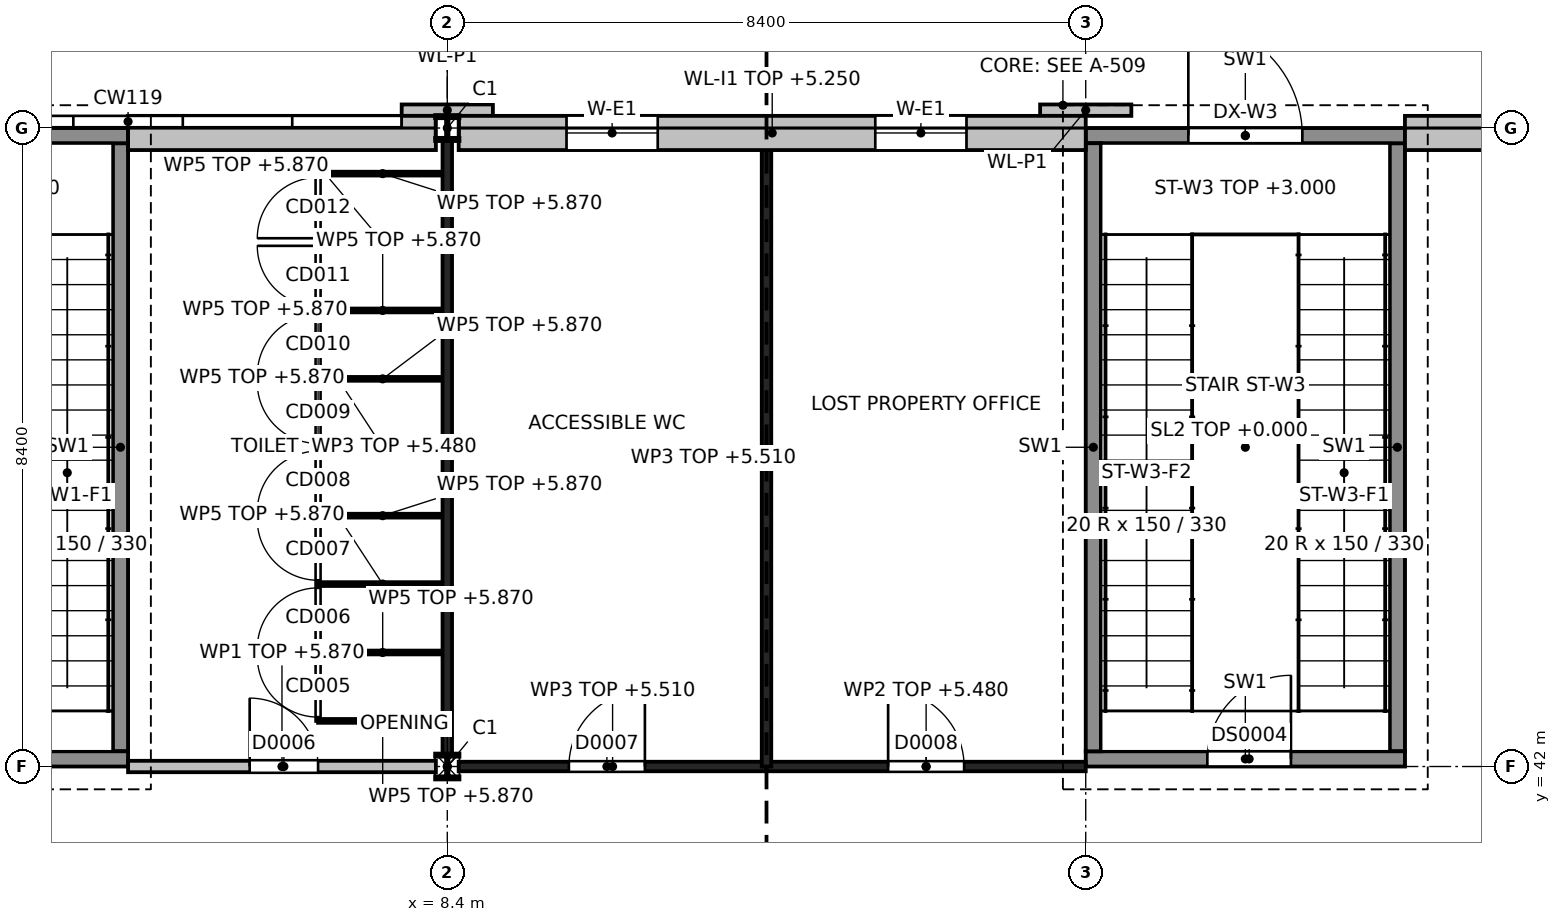
"""IFC4 building model, lengths in metres.
Left out: names, types, materials, properties, quantities, classifications, styles, units other than length and angle.
Written with IfcOpenShell. Run it as: python <this file> out.ifc"""

import sys

from ifc_helpers import new_model, si_unit, direction, frame, frame_2d, origin, origin_2d, place, context, subcontext, project, spatial, rectangle, i_section, extrude, element, fill, save


model = new_model("IFC4")
c1 = context("Model", 3, precision=1e-05, world=origin(), true_north=direction((0.0, 1.0)))
c2 = subcontext(c1, "Body", "Model", "MODEL_VIEW")
j1 = project(units=[si_unit("LENGTHUNIT", "METRE"), si_unit("PLANEANGLEUNIT", "RADIAN")], contexts=[c1])
p1 = place(None, origin())
s1 = spatial("IfcSite", under=j1, at=p1, CompositionType="ELEMENT")
p2 = place(p1, origin())
s2 = spatial("IfcBuilding", under=s1, at=p2, CompositionType="ELEMENT")
p3 = place(p2, origin())
s3 = spatial("IfcBuildingStorey", under=s2, at=p3, CompositionType="ELEMENT", Elevation=0.0)
for number, where, z_axis, x_axis in (
    (1, (8.4, 42.0, -1.35), (0.0, 0.0, 1.0), (1.0, 0.0, 0.0)),
    (2, (8.4, 50.4, -1.35), (0.0, 0.0, 1.0), (1.0, 0.0, 0.0)),
):
    element("IfcColumn", number, at=place(p3, frame(where, z_axis=z_axis, x_axis=x_axis)), inside=s3, PredefinedType="COLUMN", context=c2, shape_type="SweptSolid", body=[
        extrude(i_section(OverallWidth=0.3, OverallDepth=0.32, WebThickness=0.011, FlangeThickness=0.021, at=origin_2d()), origin(), (0.0, 0.0, 1.0), 7.35),
    ])
p4 = place(p3, frame((0.0, 42.1, -1.35), z_axis=(0.0, 0.0, 1.0), x_axis=(1.0, 0.0, 0.0)))
e3 = element("IfcWall", 3, at=p4, inside=s3, PredefinedType="SHEAR", context=c2, shape_type="SweptSolid", body=[
    extrude(rectangle(XDim=4.2, YDim=0.2, at=frame_2d((2.1, 0.0))), origin(), (0.0, 0.0, 1.0), 7.35),
])
p5 = place(p4, frame((1.6, 0.0, 1.35)))
e4 = element("IfcOpeningElement", 4, at=p5, cuts=e3, PredefinedType="OPENING", context=c2, shape_type="SweptSolid", body=[
    extrude(rectangle(XDim=1.1, YDim=2.1, at=frame_2d((0.55, 1.05))), frame((0.0, 0.1, 0.0), z_axis=(0.0, -1.0, 0.0), x_axis=(1.0, 0.0, 0.0)), (0.0, 0.0, 1.0), 0.2),
])
p6 = place(p3, frame((0.0, 50.3, -1.35), z_axis=(0.0, 0.0, 1.0), x_axis=(1.0, 0.0, 0.0)))
e5 = element("IfcWall", 5, at=p6, inside=s3, PredefinedType="SHEAR", context=c2, shape_type="SweptSolid", body=[
    extrude(rectangle(XDim=4.2, YDim=0.2, at=frame_2d((2.1, 0.0))), origin(), (0.0, 0.0, 1.0), 7.35),
])
p7 = place(p3, frame((4.1, 42.2, -1.35), z_axis=(0.0, 0.0, 1.0), x_axis=(0.0, 1.0, 0.0)))
e6 = element("IfcWall", 6, at=p7, inside=s3, PredefinedType="SHEAR", context=c2, shape_type="SweptSolid", body=[
    extrude(rectangle(XDim=8.0, YDim=0.2, at=frame_2d((4.0, 0.0))), origin(), (0.0, 0.0, 1.0), 7.35),
])
p8 = place(p3, frame((16.8, 42.1, -1.35), z_axis=(0.0, 0.0, 1.0), x_axis=(1.0, 0.0, 0.0)))
e7 = element("IfcWall", 7, at=p8, inside=s3, PredefinedType="SHEAR", context=c2, shape_type="SweptSolid", body=[
    extrude(rectangle(XDim=4.2, YDim=0.2, at=frame_2d((2.1, 0.0))), origin(), (0.0, 0.0, 1.0), 7.35),
])
p9 = place(p8, frame((1.6, 0.0, 1.35)))
e8 = element("IfcOpeningElement", 8, at=p9, cuts=e7, PredefinedType="OPENING", context=c2, shape_type="SweptSolid", body=[
    extrude(rectangle(XDim=1.1, YDim=2.1, at=frame_2d((0.55, 1.05))), frame((0.0, 0.1, 0.0), z_axis=(0.0, -1.0, 0.0), x_axis=(1.0, 0.0, 0.0)), (0.0, 0.0, 1.0), 0.2),
])
p10 = place(p3, frame((16.8, 50.3, -1.35), z_axis=(0.0, 0.0, 1.0), x_axis=(1.0, 0.0, 0.0)))
e9 = element("IfcWall", 9, at=p10, inside=s3, PredefinedType="SHEAR", context=c2, shape_type="SweptSolid", body=[
    extrude(rectangle(XDim=4.2, YDim=0.2, at=frame_2d((2.1, 0.0))), origin(), (0.0, 0.0, 1.0), 7.35),
])
p11 = place(p10, frame((1.35, 0.0, 1.35)))
e10 = element("IfcOpeningElement", 10, at=p11, cuts=e9, PredefinedType="OPENING", context=c2, shape_type="SweptSolid", body=[
    extrude(rectangle(XDim=1.5, YDim=2.4, at=frame_2d((0.75, 1.2))), frame((0.0, 0.1, 0.0), z_axis=(0.0, -1.0, 0.0), x_axis=(1.0, 0.0, 0.0)), (0.0, 0.0, 1.0), 0.2),
])
for number, where, z_axis, x_axis in (
    (11, (16.9, 42.2, -1.35), (0.0, 0.0, 1.0), (0.0, 1.0, 0.0)),
    (12, (20.9, 42.2, -1.35), (0.0, 0.0, 1.0), (0.0, 1.0, 0.0)),
):
    element("IfcWall", number, at=place(p3, frame(where, z_axis=z_axis, x_axis=x_axis)), inside=s3, PredefinedType="SHEAR", context=c2, shape_type="SweptSolid", body=[
        extrude(rectangle(XDim=8.0, YDim=0.2, at=frame_2d((4.0, 0.0))), origin(), (0.0, 0.0, 1.0), 7.35),
    ])
p12 = place(p3, frame((4.2, 50.335, 0.0), z_axis=(0.0, 0.0, 1.0), x_axis=(1.0, 0.0, 0.0)))
e13 = element("IfcWall", 13, at=p12, inside=s3, PredefinedType="SOLIDWALL", context=c2, shape_type="SweptSolid", body=[
    extrude(rectangle(XDim=4.05, YDim=0.45, at=frame_2d((2.025, 0.0))), origin(), (0.0, 0.0, 1.0), 5.25),
])
p13 = place(p3, frame((8.55, 50.335, 0.0), z_axis=(0.0, 0.0, 1.0), x_axis=(1.0, 0.0, 0.0)))
e14 = element("IfcWall", 14, at=p13, inside=s3, PredefinedType="SOLIDWALL", context=c2, shape_type="SweptSolid", body=[
    extrude(rectangle(XDim=8.25, YDim=0.45, at=frame_2d((4.125, 0.0))), origin(), (0.0, 0.0, 1.0), 5.25),
])
p14 = place(p13, frame((1.419, 0.0, 0.9)))
e15 = element("IfcOpeningElement", 15, at=p14, cuts=e14, PredefinedType="OPENING", context=c2, shape_type="SweptSolid", body=[
    extrude(rectangle(XDim=1.2, YDim=3.0, at=frame_2d((0.6, 1.5))), frame((0.0, 0.225, 0.0), z_axis=(0.0, -1.0, 0.0), x_axis=(1.0, 0.0, 0.0)), (0.0, 0.0, 1.0), 0.45),
])
p15 = place(p13, frame((5.481, 0.0, 0.9)))
e16 = element("IfcOpeningElement", 16, at=p15, cuts=e14, PredefinedType="OPENING", context=c2, shape_type="SweptSolid", body=[
    extrude(rectangle(XDim=1.2, YDim=3.0, at=frame_2d((0.6, 1.5))), frame((0.0, 0.225, 0.0), z_axis=(0.0, -1.0, 0.0), x_axis=(1.0, 0.0, 0.0)), (0.0, 0.0, 1.0), 0.45),
])
p16 = place(p3, frame((21.0, 50.335, 0.0), z_axis=(0.0, 0.0, 1.0), x_axis=(1.0, 0.0, 0.0)))
e17 = element("IfcWall", 17, at=p16, inside=s3, PredefinedType="SOLIDWALL", context=c2, shape_type="SweptSolid", body=[
    extrude(rectangle(XDim=4.05, YDim=0.45, at=frame_2d((2.025, 0.0))), origin(), (0.0, 0.0, 1.0), 5.25),
])
for number, where, z_axis, x_axis in (
    (18, (7.8, 50.635, 0.0), (0.0, 0.0, 1.0), (1.0, 0.0, 0.0)),
    (19, (16.2, 50.635, 0.0), (0.0, 0.0, 1.0), (1.0, 0.0, 0.0)),
):
    element("IfcWall", number, at=place(p3, frame(where, z_axis=z_axis, x_axis=x_axis)), inside=s3, PredefinedType="SOLIDWALL", context=c2, shape_type="SweptSolid", body=[
        extrude(rectangle(XDim=1.2, YDim=0.15, at=frame_2d((0.6, 0.0))), origin(), (0.0, 0.0, 1.0), 6.0),
    ])
p17 = place(p3, frame((4.2, 42.0, 0.0), z_axis=(0.0, 0.0, 1.0), x_axis=(1.0, 0.0, 0.0)))
e20 = element("IfcWall", 20, at=p17, inside=s3, PredefinedType="PARTITIONING", context=c2, shape_type="SweptSolid", body=[
    extrude(rectangle(XDim=4.05, YDim=0.15, at=frame_2d((2.025, 0.0))), origin(), (0.0, 0.0, 1.0), 5.87),
])
p18 = place(p17, frame((1.6, 0.0, 0.0)))
e21 = element("IfcOpeningElement", 21, at=p18, cuts=e20, PredefinedType="OPENING", context=c2, shape_type="SweptSolid", body=[
    extrude(rectangle(XDim=0.9, YDim=2.1, at=frame_2d((0.45, 1.05))), frame((0.0, 0.075, 0.0), z_axis=(0.0, -1.0, 0.0), x_axis=(1.0, 0.0, 0.0)), (0.0, 0.0, 1.0), 0.15),
])
p19 = place(p3, frame((8.55, 42.0, 0.0), z_axis=(0.0, 0.0, 1.0), x_axis=(1.0, 0.0, 0.0)))
e22 = element("IfcWall", 22, at=p19, inside=s3, PredefinedType="PARTITIONING", context=c2, shape_type="SweptSolid", body=[
    extrude(rectangle(XDim=4.05, YDim=0.125, at=frame_2d((2.025, 0.0))), origin(), (0.0, 0.0, 1.0), 5.51),
])
p20 = place(p19, frame((1.45, 0.0, 0.0)))
e23 = element("IfcOpeningElement", 23, at=p20, cuts=e22, PredefinedType="OPENING", context=c2, shape_type="SweptSolid", body=[
    extrude(rectangle(XDim=1.0, YDim=2.1, at=frame_2d((0.5, 1.05))), frame((0.0, 0.062, 0.0), z_axis=(0.0, -1.0, 0.0), x_axis=(1.0, 0.0, 0.0)), (0.0, 0.0, 1.0), 0.125),
])
p21 = place(p3, frame((12.6, 42.0, 0.0), z_axis=(0.0, 0.0, 1.0), x_axis=(1.0, 0.0, 0.0)))
e24 = element("IfcWall", 24, at=p21, inside=s3, PredefinedType="PARTITIONING", context=c2, shape_type="SweptSolid", body=[
    extrude(rectangle(XDim=4.2, YDim=0.125, at=frame_2d((2.1, 0.0))), origin(), (0.0, 0.0, 1.0), 5.48),
])
p22 = place(p21, frame((1.6, 0.0, 0.0)))
e25 = element("IfcOpeningElement", 25, at=p22, cuts=e24, PredefinedType="OPENING", context=c2, shape_type="SweptSolid", body=[
    extrude(rectangle(XDim=1.0, YDim=2.2, at=frame_2d((0.5, 1.1))), frame((0.0, 0.062, 0.0), z_axis=(0.0, -1.0, 0.0), x_axis=(1.0, 0.0, 0.0)), (0.0, 0.0, 1.0), 0.125),
])
p23 = place(p3, frame((8.4, 42.16, 0.0), z_axis=(0.0, 0.0, 1.0), x_axis=(0.0, 1.0, 0.0)))
e26 = element("IfcWall", 26, at=p23, inside=s3, PredefinedType="PARTITIONING", context=c2, shape_type="SweptSolid", body=[
    extrude(rectangle(XDim=8.08, YDim=0.125, at=frame_2d((4.04, 0.0))), origin(), (0.0, 0.0, 1.0), 5.48),
])
p24 = place(p3, frame((12.6, 42.0, 0.0), z_axis=(0.0, 0.0, 1.0), x_axis=(0.0, 1.0, 0.0)))
e27 = element("IfcWall", 27, at=p24, inside=s3, PredefinedType="PARTITIONING", context=c2, shape_type="SweptSolid", body=[
    extrude(rectangle(XDim=8.11, YDim=0.125, at=frame_2d((4.055, 0.0))), origin(), (0.0, 0.0, 1.0), 5.51),
])
p25 = place(p3, frame((6.7, 42.6, 0.0), z_axis=(0.0, 0.0, 1.0), x_axis=(0.0, 1.0, 0.0)))
e28 = element("IfcWall", 28, at=p25, inside=s3, PredefinedType="PARTITIONING", context=c2, shape_type="SweptSolid", body=[
    extrude(rectangle(XDim=7.2, YDim=0.05, at=frame_2d((3.6, 0.0))), origin(), (0.0, 0.0, 1.0), 5.87),
])
p26 = place(p25, frame((0.05, 0.0, 0.0)))
e29 = element("IfcOpeningElement", 29, at=p26, cuts=e28, PredefinedType="OPENING", context=c2, shape_type="SweptSolid", body=[
    extrude(rectangle(XDim=0.8, YDim=2.0, at=frame_2d((0.4, 1.0))), frame((0.0, 0.025, 0.0), z_axis=(0.0, -1.0, 0.0), x_axis=(1.0, 0.0, 0.0)), (0.0, 0.0, 1.0), 0.05),
])
p27 = place(p25, frame((0.95, 0.0, 0.0)))
e30 = element("IfcOpeningElement", 30, at=p27, cuts=e28, PredefinedType="OPENING", context=c2, shape_type="SweptSolid", body=[
    extrude(rectangle(XDim=0.8, YDim=2.0, at=frame_2d((0.4, 1.0))), frame((0.0, 0.025, 0.0), z_axis=(0.0, -1.0, 0.0), x_axis=(1.0, 0.0, 0.0)), (0.0, 0.0, 1.0), 0.05),
])
p28 = place(p25, frame((1.85, 0.0, 0.0)))
e31 = element("IfcOpeningElement", 31, at=p28, cuts=e28, PredefinedType="OPENING", context=c2, shape_type="SweptSolid", body=[
    extrude(rectangle(XDim=0.8, YDim=2.0, at=frame_2d((0.4, 1.0))), frame((0.0, 0.025, 0.0), z_axis=(0.0, -1.0, 0.0), x_axis=(1.0, 0.0, 0.0)), (0.0, 0.0, 1.0), 0.05),
])
p29 = place(p25, frame((2.75, 0.0, 0.0)))
e32 = element("IfcOpeningElement", 32, at=p29, cuts=e28, PredefinedType="OPENING", context=c2, shape_type="SweptSolid", body=[
    extrude(rectangle(XDim=0.8, YDim=2.0, at=frame_2d((0.4, 1.0))), frame((0.0, 0.025, 0.0), z_axis=(0.0, -1.0, 0.0), x_axis=(1.0, 0.0, 0.0)), (0.0, 0.0, 1.0), 0.05),
])
p30 = place(p25, frame((3.65, 0.0, 0.0)))
e33 = element("IfcOpeningElement", 33, at=p30, cuts=e28, PredefinedType="OPENING", context=c2, shape_type="SweptSolid", body=[
    extrude(rectangle(XDim=0.8, YDim=2.0, at=frame_2d((0.4, 1.0))), frame((0.0, 0.025, 0.0), z_axis=(0.0, -1.0, 0.0), x_axis=(1.0, 0.0, 0.0)), (0.0, 0.0, 1.0), 0.05),
])
p31 = place(p25, frame((4.55, 0.0, 0.0)))
e34 = element("IfcOpeningElement", 34, at=p31, cuts=e28, PredefinedType="OPENING", context=c2, shape_type="SweptSolid", body=[
    extrude(rectangle(XDim=0.8, YDim=2.0, at=frame_2d((0.4, 1.0))), frame((0.0, 0.025, 0.0), z_axis=(0.0, -1.0, 0.0), x_axis=(1.0, 0.0, 0.0)), (0.0, 0.0, 1.0), 0.05),
])
p32 = place(p25, frame((5.45, 0.0, 0.0)))
e35 = element("IfcOpeningElement", 35, at=p32, cuts=e28, PredefinedType="OPENING", context=c2, shape_type="SweptSolid", body=[
    extrude(rectangle(XDim=0.8, YDim=2.0, at=frame_2d((0.4, 1.0))), frame((0.0, 0.025, 0.0), z_axis=(0.0, -1.0, 0.0), x_axis=(1.0, 0.0, 0.0)), (0.0, 0.0, 1.0), 0.05),
])
p33 = place(p25, frame((6.35, 0.0, 0.0)))
e36 = element("IfcOpeningElement", 36, at=p33, cuts=e28, PredefinedType="OPENING", context=c2, shape_type="SweptSolid", body=[
    extrude(rectangle(XDim=0.8, YDim=2.0, at=frame_2d((0.4, 1.0))), frame((0.0, 0.025, 0.0), z_axis=(0.0, -1.0, 0.0), x_axis=(1.0, 0.0, 0.0)), (0.0, 0.0, 1.0), 0.05),
])
for number, where, z_axis, x_axis in (
    (37, (8.4, 42.6, 0.0), (0.0, 0.0, 1.0), (-1.0, 0.0, 0.0)),
    (38, (8.4, 43.5, 0.0), (0.0, 0.0, 1.0), (-1.0, 0.0, 0.0)),
    (39, (8.4, 44.4, 0.0), (0.0, 0.0, 1.0), (-1.0, 0.0, 0.0)),
    (40, (8.4, 45.3, 0.0), (0.0, 0.0, 1.0), (-1.0, 0.0, 0.0)),
    (41, (8.4, 46.2, 0.0), (0.0, 0.0, 1.0), (-1.0, 0.0, 0.0)),
    (42, (8.4, 47.1, 0.0), (0.0, 0.0, 1.0), (-1.0, 0.0, 0.0)),
    (43, (8.4, 48.0, 0.0), (0.0, 0.0, 1.0), (-1.0, 0.0, 0.0)),
    (44, (8.4, 48.9, 0.0), (0.0, 0.0, 1.0), (-1.0, 0.0, 0.0)),
    (45, (8.4, 49.8, 0.0), (0.0, 0.0, 1.0), (-1.0, 0.0, 0.0)),
):
    element("IfcWall", number, at=place(p3, frame(where, z_axis=z_axis, x_axis=x_axis)), inside=s3, PredefinedType="PARTITIONING", context=c2, shape_type="SweptSolid", body=[
        extrude(rectangle(XDim=1.7, YDim=0.05, at=frame_2d((0.85, 0.0))), origin(), (0.0, 0.0, 1.0), 5.87),
    ])
p34 = place(p14, origin())
e46 = element("IfcWindow", 46, at=p34, inside=s3, PartitioningType="SINGLE_PANEL", PredefinedType="WINDOW", context=c2, shape_type="SweptSolid", body=[
    extrude(rectangle(XDim=1.2, YDim=3.0, at=frame_2d((0.6, 1.5))), frame((0.0, 0.03, 0.0), z_axis=(0.0, -1.0, 0.0), x_axis=(1.0, 0.0, 0.0)), (0.0, 0.0, 1.0), 0.06),
])
fill(e15, e46)
p35 = place(p15, origin())
e47 = element("IfcWindow", 47, at=p35, inside=s3, PartitioningType="SINGLE_PANEL", PredefinedType="WINDOW", context=c2, shape_type="SweptSolid", body=[
    extrude(rectangle(XDim=1.2, YDim=3.0, at=frame_2d((0.6, 1.5))), frame((0.0, 0.03, 0.0), z_axis=(0.0, -1.0, 0.0), x_axis=(1.0, 0.0, 0.0)), (0.0, 0.0, 1.0), 0.06),
])
fill(e16, e47)
p36 = place(p11, origin())
e48 = element("IfcDoor", 48, at=p36, inside=s3, OperationType="DOUBLE_DOOR_SINGLE_SWING", PredefinedType="DOOR", context=c2, shape_type="SweptSolid", body=[
    extrude(rectangle(XDim=1.5, YDim=2.4, at=frame_2d((0.75, 1.2))), frame((0.0, 0.025, 0.0), z_axis=(0.0, -1.0, 0.0), x_axis=(1.0, 0.0, 0.0)), (0.0, 0.0, 1.0), 0.05),
])
fill(e10, e48)
p37 = place(p18, origin())
e49 = element("IfcDoor", 49, at=p37, inside=s3, OperationType="SINGLE_SWING_LEFT", PredefinedType="DOOR", context=c2, shape_type="SweptSolid", body=[
    extrude(rectangle(XDim=0.9, YDim=2.1, at=frame_2d((0.45, 1.05))), frame((0.0, 0.025, 0.0), z_axis=(0.0, -1.0, 0.0), x_axis=(1.0, 0.0, 0.0)), (0.0, 0.0, 1.0), 0.05),
])
fill(e21, e49)
p38 = place(p20, origin())
e50 = element("IfcDoor", 50, at=p38, inside=s3, OperationType="SINGLE_SWING_RIGHT", PredefinedType="DOOR", context=c2, shape_type="SweptSolid", body=[
    extrude(rectangle(XDim=1.0, YDim=2.1, at=frame_2d((0.5, 1.05))), frame((0.0, 0.025, 0.0), z_axis=(0.0, -1.0, 0.0), x_axis=(1.0, 0.0, 0.0)), (0.0, 0.0, 1.0), 0.05),
])
fill(e23, e50)
p39 = place(p22, origin())
e51 = element("IfcDoor", 51, at=p39, inside=s3, OperationType="SINGLE_SWING_LEFT", PredefinedType="DOOR", context=c2, shape_type="SweptSolid", body=[
    extrude(rectangle(XDim=1.0, YDim=2.2, at=frame_2d((0.5, 1.1))), frame((0.0, 0.025, 0.0), z_axis=(0.0, -1.0, 0.0), x_axis=(1.0, 0.0, 0.0)), (0.0, 0.0, 1.0), 0.05),
])
fill(e25, e51)
p40 = place(p9, frame((1.1, 0.05, 0.0), z_axis=(0.0, 0.0, 1.0), x_axis=(-1.0, 0.0, 0.0)))
e52 = element("IfcDoor", 52, at=p40, inside=s3, OperationType="SINGLE_SWING_RIGHT", PredefinedType="DOOR", context=c2, shape_type="SweptSolid", body=[
    extrude(rectangle(XDim=1.1, YDim=2.1, at=frame_2d((0.55, 1.05))), frame((0.0, 0.025, 0.0), z_axis=(0.0, -1.0, 0.0), x_axis=(1.0, 0.0, 0.0)), (0.0, 0.0, 1.0), 0.05),
])
fill(e8, e52)
p41 = place(p26, origin())
e53 = element("IfcDoor", 53, at=p41, inside=s3, OperationType="SINGLE_SWING_RIGHT", PredefinedType="DOOR", context=c2, shape_type="SweptSolid", body=[
    extrude(rectangle(XDim=0.8, YDim=2.0, at=frame_2d((0.4, 1.0))), frame((0.0, 0.025, 0.0), z_axis=(0.0, -1.0, 0.0), x_axis=(1.0, 0.0, 0.0)), (0.0, 0.0, 1.0), 0.05),
])
fill(e29, e53)
p42 = place(p27, origin())
e54 = element("IfcDoor", 54, at=p42, inside=s3, OperationType="SINGLE_SWING_LEFT", PredefinedType="DOOR", context=c2, shape_type="SweptSolid", body=[
    extrude(rectangle(XDim=0.8, YDim=2.0, at=frame_2d((0.4, 1.0))), frame((0.0, 0.025, 0.0), z_axis=(0.0, -1.0, 0.0), x_axis=(1.0, 0.0, 0.0)), (0.0, 0.0, 1.0), 0.05),
])
fill(e30, e54)
p43 = place(p28, origin())
e55 = element("IfcDoor", 55, at=p43, inside=s3, OperationType="SINGLE_SWING_RIGHT", PredefinedType="DOOR", context=c2, shape_type="SweptSolid", body=[
    extrude(rectangle(XDim=0.8, YDim=2.0, at=frame_2d((0.4, 1.0))), frame((0.0, 0.025, 0.0), z_axis=(0.0, -1.0, 0.0), x_axis=(1.0, 0.0, 0.0)), (0.0, 0.0, 1.0), 0.05),
])
fill(e31, e55)
p44 = place(p29, origin())
e56 = element("IfcDoor", 56, at=p44, inside=s3, OperationType="SINGLE_SWING_LEFT", PredefinedType="DOOR", context=c2, shape_type="SweptSolid", body=[
    extrude(rectangle(XDim=0.8, YDim=2.0, at=frame_2d((0.4, 1.0))), frame((0.0, 0.025, 0.0), z_axis=(0.0, -1.0, 0.0), x_axis=(1.0, 0.0, 0.0)), (0.0, 0.0, 1.0), 0.05),
])
fill(e32, e56)
p45 = place(p30, origin())
e57 = element("IfcDoor", 57, at=p45, inside=s3, OperationType="SINGLE_SWING_RIGHT", PredefinedType="DOOR", context=c2, shape_type="SweptSolid", body=[
    extrude(rectangle(XDim=0.8, YDim=2.0, at=frame_2d((0.4, 1.0))), frame((0.0, 0.025, 0.0), z_axis=(0.0, -1.0, 0.0), x_axis=(1.0, 0.0, 0.0)), (0.0, 0.0, 1.0), 0.05),
])
fill(e33, e57)
p46 = place(p31, origin())
e58 = element("IfcDoor", 58, at=p46, inside=s3, OperationType="SINGLE_SWING_LEFT", PredefinedType="DOOR", context=c2, shape_type="SweptSolid", body=[
    extrude(rectangle(XDim=0.8, YDim=2.0, at=frame_2d((0.4, 1.0))), frame((0.0, 0.025, 0.0), z_axis=(0.0, -1.0, 0.0), x_axis=(1.0, 0.0, 0.0)), (0.0, 0.0, 1.0), 0.05),
])
fill(e34, e58)
p47 = place(p32, origin())
e59 = element("IfcDoor", 59, at=p47, inside=s3, OperationType="SINGLE_SWING_RIGHT", PredefinedType="DOOR", context=c2, shape_type="SweptSolid", body=[
    extrude(rectangle(XDim=0.8, YDim=2.0, at=frame_2d((0.4, 1.0))), frame((0.0, 0.025, 0.0), z_axis=(0.0, -1.0, 0.0), x_axis=(1.0, 0.0, 0.0)), (0.0, 0.0, 1.0), 0.05),
])
fill(e35, e59)
p48 = place(p33, origin())
e60 = element("IfcDoor", 60, at=p48, inside=s3, OperationType="SINGLE_SWING_LEFT", PredefinedType="DOOR", context=c2, shape_type="SweptSolid", body=[
    extrude(rectangle(XDim=0.8, YDim=2.0, at=frame_2d((0.4, 1.0))), frame((0.0, 0.025, 0.0), z_axis=(0.0, -1.0, 0.0), x_axis=(1.0, 0.0, 0.0)), (0.0, 0.0, 1.0), 0.05),
])
fill(e36, e60)
save(model, sys.argv[1])
